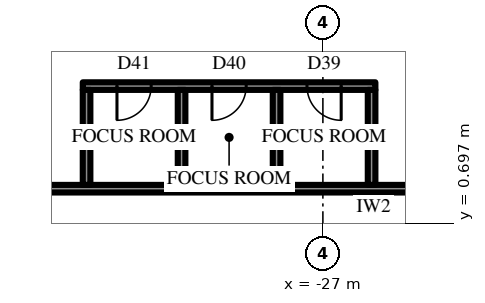
"""IFC4 building model, lengths in metres.
Left out: names, types, materials, properties, quantities, classifications, styles, units other than length and angle.
Written with IfcOpenShell. Run it as: python <this file> out.ifc"""

import sys

from ifc_helpers import new_model, si_unit, direction, frame, frame_2d, origin, place, context, subcontext, project, spatial, rectangle, extrude, element, fill, save


model = new_model("IFC4")
c1 = context("Model", 3, precision=1e-05, world=origin(), true_north=direction((0.0, 1.0)))
c2 = subcontext(c1, "Body", "Model", "MODEL_VIEW")
j1 = project(units=[si_unit("LENGTHUNIT", "METRE"), si_unit("PLANEANGLEUNIT", "RADIAN")], contexts=[c1])
p1 = place(None, origin())
s1 = spatial("IfcSite", under=j1, at=p1, CompositionType="ELEMENT")
p2 = place(p1, origin())
s2 = spatial("IfcBuilding", under=s1, at=p2, CompositionType="ELEMENT")
p3 = place(p2, frame((0.0, 0.0, 61.3)))
s3 = spatial("IfcBuildingStorey", under=s2, at=p3, CompositionType="ELEMENT", Elevation=61.3)
p4 = place(p3, frame((-21.1, 1.6, 0.0), z_axis=(0.0, 0.0, 1.0), x_axis=(-1.0, 0.0, 0.0)))
e1 = element("IfcWall", 1, at=p4, inside=s3, PredefinedType="PARTITIONING", context=c2, shape_type="SweptSolid", body=[
    extrude(rectangle(XDim=15.215, YDim=0.2, at=frame_2d((7.608, 0.0))), origin(), (0.0, 0.0, 1.0), 4.0),
])
p5 = place(p4, frame((1.021, 0.0, 0.0)))
e2 = element("IfcOpeningElement", 2, at=p5, cuts=e1, PredefinedType="OPENING", context=c2, shape_type="SweptSolid", body=[
    extrude(rectangle(XDim=1.0, YDim=2.2, at=frame_2d((0.5, 1.1))), frame((0.0, 0.11, 0.0), z_axis=(0.0, -1.0, 0.0), x_axis=(1.0, 0.0, 0.0)), (0.0, 0.0, 1.0), 0.22),
])
p6 = place(p3, frame((-25.618, 4.3, 0.0), z_axis=(0.0, 0.0, 1.0), x_axis=(-1.0, 0.0, 0.0)))
e3 = element("IfcWall", 3, at=p6, inside=s3, PredefinedType="PARTITIONING", context=c2, shape_type="SweptSolid", body=[
    extrude(rectangle(XDim=7.7, YDim=0.2, at=frame_2d((3.85, 0.0))), origin(), (0.0, 0.0, 1.0), 4.0),
])
p7 = place(p6, frame((0.9, 0.0, 0.0)))
e4 = element("IfcOpeningElement", 4, at=p7, cuts=e3, PredefinedType="OPENING", context=c2, shape_type="SweptSolid", body=[
    extrude(rectangle(XDim=0.9, YDim=2.2, at=frame_2d((0.45, 1.1))), frame((0.0, 0.11, 0.0), z_axis=(0.0, -1.0, 0.0), x_axis=(1.0, 0.0, 0.0)), (0.0, 0.0, 1.0), 0.22),
])
p8 = place(p6, frame((3.4, 0.0, 0.0)))
e5 = element("IfcOpeningElement", 5, at=p8, cuts=e3, PredefinedType="OPENING", context=c2, shape_type="SweptSolid", body=[
    extrude(rectangle(XDim=0.9, YDim=2.2, at=frame_2d((0.45, 1.1))), frame((0.0, 0.11, 0.0), z_axis=(0.0, -1.0, 0.0), x_axis=(1.0, 0.0, 0.0)), (0.0, 0.0, 1.0), 0.22),
])
p9 = place(p6, frame((5.9, 0.0, 0.0)))
e6 = element("IfcOpeningElement", 6, at=p9, cuts=e3, PredefinedType="OPENING", context=c2, shape_type="SweptSolid", body=[
    extrude(rectangle(XDim=0.9, YDim=2.2, at=frame_2d((0.45, 1.1))), frame((0.0, 0.11, 0.0), z_axis=(0.0, -1.0, 0.0), x_axis=(1.0, 0.0, 0.0)), (0.0, 0.0, 1.0), 0.22),
])
for number, where, z_axis, x_axis in (
    (7, (-25.719, 1.7, 0.0), (0.0, 0.0, 1.0), (0.0, 1.0, 0.0)),
    (8, (-28.219, 1.7, 0.0), (0.0, 0.0, 1.0), (0.0, 1.0, 0.0)),
    (9, (-30.719, 1.7, 0.0), (0.0, 0.0, 1.0), (0.0, 1.0, 0.0)),
    (10, (-33.219, 1.7, 0.0), (0.0, 0.0, 1.0), (0.0, 1.0, 0.0)),
):
    element("IfcWall", number, at=place(p3, frame(where, z_axis=z_axis, x_axis=x_axis)), inside=s3, PredefinedType="PARTITIONING", context=c2, shape_type="SweptSolid", body=[
        extrude(rectangle(XDim=2.5, YDim=0.2, at=frame_2d((1.25, 0.0))), origin(), (0.0, 0.0, 1.0), 4.0),
    ])
p10 = place(p7, origin())
e11 = element("IfcDoor", 11, at=p10, inside=s3, OperationType="SINGLE_SWING_RIGHT", PredefinedType="DOOR", context=c2, shape_type="SweptSolid", body=[
    extrude(rectangle(XDim=0.9, YDim=2.2, at=frame_2d((0.45, 1.1))), frame((0.0, 0.025, 0.0), z_axis=(0.0, -1.0, 0.0), x_axis=(1.0, 0.0, 0.0)), (0.0, 0.0, 1.0), 0.05),
])
fill(e4, e11)
p11 = place(p8, origin())
e12 = element("IfcDoor", 12, at=p11, inside=s3, OperationType="SINGLE_SWING_LEFT", PredefinedType="DOOR", context=c2, shape_type="SweptSolid", body=[
    extrude(rectangle(XDim=0.9, YDim=2.2, at=frame_2d((0.45, 1.1))), frame((0.0, 0.025, 0.0), z_axis=(0.0, -1.0, 0.0), x_axis=(1.0, 0.0, 0.0)), (0.0, 0.0, 1.0), 0.05),
])
fill(e5, e12)
p12 = place(p9, origin())
e13 = element("IfcDoor", 13, at=p12, inside=s3, OperationType="SINGLE_SWING_LEFT", PredefinedType="DOOR", context=c2, shape_type="SweptSolid", body=[
    extrude(rectangle(XDim=0.9, YDim=2.2, at=frame_2d((0.45, 1.1))), frame((0.0, 0.025, 0.0), z_axis=(0.0, -1.0, 0.0), x_axis=(1.0, 0.0, 0.0)), (0.0, 0.0, 1.0), 0.05),
])
fill(e6, e13)
save(model, sys.argv[1])
